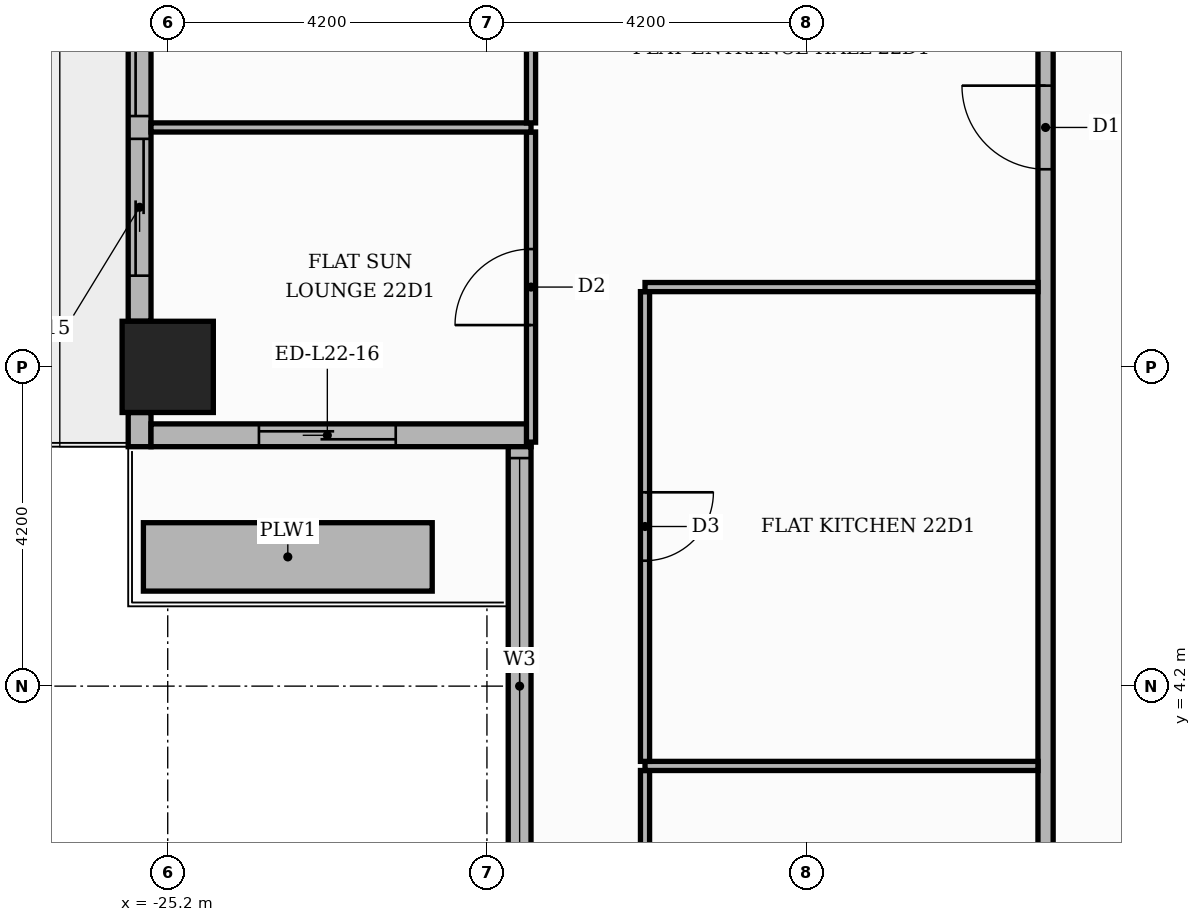
"""IFC4 building model, lengths in metres.
Left out: names, types, materials, properties, quantities, classifications, styles, units other than length and angle.
Written with IfcOpenShell. Run it as: python <this file> out.ifc"""

import sys

from ifc_helpers import new_model, si_unit, direction, frame, frame_2d, origin, origin_2d, place, context, subcontext, project, spatial, rectangle, extrude, element, fill, save


model = new_model("IFC4")
c1 = context("Model", 3, precision=1e-05, world=origin(), true_north=direction((0.0, 1.0)))
c2 = subcontext(c1, "Body", "Model", "MODEL_VIEW")
j1 = project(units=[si_unit("LENGTHUNIT", "METRE"), si_unit("PLANEANGLEUNIT", "RADIAN")], contexts=[c1])
p1 = place(None, origin())
s1 = spatial("IfcSite", under=j1, at=p1, CompositionType="ELEMENT")
p2 = place(p1, origin())
s2 = spatial("IfcBuilding", under=s1, at=p2, CompositionType="ELEMENT")
p3 = place(p2, frame((0.0, 0.0, 94.8)))
s3 = spatial("IfcBuildingStorey", under=s2, at=p3, CompositionType="ELEMENT", Elevation=94.8)
p4 = place(p3, frame((-25.2, 8.4, 0.0), z_axis=(0.0, 0.0, 1.0), x_axis=(1.0, 0.0, 0.0)))
e1 = element("IfcColumn", 1, at=p4, inside=s3, PredefinedType="COLUMN", context=c2, shape_type="SweptSolid", body=[
    extrude(rectangle(XDim=1.2, YDim=1.2, at=origin_2d()), origin(), (0.0, 0.0, 1.0), 3.9),
])
p5 = place(p3, frame((-25.57, 16.2, 0.0), z_axis=(0.0, 0.0, 1.0), x_axis=(0.0, -1.0, 0.0)))
e2 = element("IfcWall", 2, at=p5, inside=s3, PredefinedType="STANDARD", context=c2, shape_type="SweptSolid", body=[
    extrude(rectangle(XDim=7.2, YDim=0.3, at=frame_2d((3.6, 0.0))), origin(), (0.0, 0.0, 1.0), 3.48),
])
p6 = place(p5, frame((0.6, 0.0, 0.0)))
e3 = element("IfcOpeningElement", 3, at=p6, cuts=e2, PredefinedType="OPENING", context=c2, shape_type="SweptSolid", body=[
    extrude(rectangle(XDim=3.9, YDim=2.4, at=frame_2d((1.95, 1.2))), frame((0.0, 0.16, 0.0), z_axis=(0.0, -1.0, 0.0), x_axis=(1.0, 0.0, 0.0)), (0.0, 0.0, 1.0), 0.32),
])
p7 = place(p5, frame((4.8, 0.0, 0.0)))
e4 = element("IfcOpeningElement", 4, at=p7, cuts=e2, PredefinedType="OPENING", context=c2, shape_type="SweptSolid", body=[
    extrude(rectangle(XDim=1.8, YDim=2.4, at=frame_2d((0.9, 1.2))), frame((0.0, 0.16, 0.0), z_axis=(0.0, -1.0, 0.0), x_axis=(1.0, 0.0, 0.0)), (0.0, 0.0, 1.0), 0.32),
])
p8 = place(p3, frame((-25.57, 7.8, 0.0), z_axis=(0.0, 0.0, 1.0), x_axis=(0.0, -1.0, 0.0)))
e5 = element("IfcWall", 5, at=p8, inside=s3, PredefinedType="STANDARD", context=c2, shape_type="SweptSolid", body=[
    extrude(rectangle(XDim=0.45, YDim=0.3, at=frame_2d((0.225, 0.0))), origin(), (0.0, 0.0, 1.0), 3.48),
])
p9 = place(p3, frame((-25.42, 7.5, 0.0), z_axis=(0.0, 0.0, 1.0), x_axis=(1.0, 0.0, 0.0)))
e6 = element("IfcWall", 6, at=p9, inside=s3, PredefinedType="STANDARD", context=c2, shape_type="SweptSolid", body=[
    extrude(rectangle(XDim=5.0, YDim=0.3, at=frame_2d((2.5, 0.0))), origin(), (0.0, 0.0, 1.0), 3.48),
])
p10 = place(p9, frame((1.42, 0.0, 0.0)))
e7 = element("IfcOpeningElement", 7, at=p10, cuts=e6, PredefinedType="OPENING", context=c2, shape_type="SweptSolid", body=[
    extrude(rectangle(XDim=1.8, YDim=2.4, at=frame_2d((0.9, 1.2))), frame((0.0, 0.16, 0.0), z_axis=(0.0, -1.0, 0.0), x_axis=(1.0, 0.0, 0.0)), (0.0, 0.0, 1.0), 0.32),
])
p11 = place(p3, frame((-20.57, 7.35, 0.0), z_axis=(0.0, 0.0, 1.0), x_axis=(0.0, -1.0, 0.0)))
e8 = element("IfcWall", 8, at=p11, inside=s3, PredefinedType="STANDARD", context=c2, shape_type="SweptSolid", body=[
    extrude(rectangle(XDim=15.0, YDim=0.3, at=frame_2d((7.5, 0.0))), origin(), (0.0, 0.0, 1.0), 3.48),
])
p12 = place(p11, frame((0.15, 0.0, 0.9)))
e9 = element("IfcOpeningElement", 9, at=p12, cuts=e8, PredefinedType="OPENING", context=c2, shape_type="SweptSolid", body=[
    extrude(rectangle(XDim=6.0, YDim=2.1, at=frame_2d((3.0, 1.05))), frame((0.0, 0.16, 0.0), z_axis=(0.0, -1.0, 0.0), x_axis=(1.0, 0.0, 0.0)), (0.0, 0.0, 1.0), 0.32),
])
p13 = place(p11, frame((6.45, 0.0, 0.9)))
e10 = element("IfcOpeningElement", 10, at=p13, cuts=e8, PredefinedType="OPENING", context=c2, shape_type="SweptSolid", body=[
    extrude(rectangle(XDim=6.0, YDim=2.1, at=frame_2d((3.0, 1.05))), frame((0.0, 0.16, 0.0), z_axis=(0.0, -1.0, 0.0), x_axis=(1.0, 0.0, 0.0)), (0.0, 0.0, 1.0), 0.32),
])
p14 = place(p11, frame((12.75, 0.0, 0.9)))
e11 = element("IfcOpeningElement", 11, at=p14, cuts=e8, PredefinedType="OPENING", context=c2, shape_type="SweptSolid", body=[
    extrude(rectangle(XDim=1.8, YDim=2.1, at=frame_2d((0.9, 1.05))), frame((0.0, 0.16, 0.0), z_axis=(0.0, -1.0, 0.0), x_axis=(1.0, 0.0, 0.0)), (0.0, 0.0, 1.0), 0.32),
])
p15 = place(p3, frame((-25.52, 5.9, 0.0), z_axis=(0.0, 0.0, 1.0), x_axis=(1.0, 0.0, 0.0)))
e12 = element("IfcWall", 12, at=p15, inside=s3, PredefinedType="MOVABLE", context=c2, shape_type="SweptSolid", body=[
    extrude(rectangle(XDim=3.8, YDim=0.9, at=frame_2d((1.9, 0.0))), origin(), (0.0, 0.0, 1.0), 0.6),
])
p16 = place(p3, frame((-13.65, -13.55, 0.0), z_axis=(0.0, 0.0, 1.0), x_axis=(0.0, 1.0, 0.0)))
e13 = element("IfcWall", 13, at=p16, inside=s3, PredefinedType="PARTITIONING", context=c2, shape_type="SweptSolid", body=[
    extrude(rectangle(XDim=27.1, YDim=0.2, at=frame_2d((13.55, 0.0))), origin(), (0.0, 0.0, 1.0), 3.48),
])
p17 = place(p16, frame((24.55, 0.0, 0.0)))
e14 = element("IfcOpeningElement", 14, at=p17, cuts=e13, PredefinedType="OPENING", context=c2, shape_type="SweptSolid", body=[
    extrude(rectangle(XDim=1.1, YDim=2.4, at=frame_2d((0.55, 1.2))), frame((0.0, 0.11, 0.0), z_axis=(0.0, -1.0, 0.0), x_axis=(1.0, 0.0, 0.0)), (0.0, 0.0, 1.0), 0.22),
])
p18 = place(p3, frame((-18.92, -3.09, 0.0), z_axis=(0.0, 0.0, 1.0), x_axis=(0.0, 1.0, 0.0)))
e15 = element("IfcWall", 15, at=p18, inside=s3, PredefinedType="PARTITIONING", context=c2, shape_type="SweptSolid", body=[
    extrude(rectangle(XDim=6.18, YDim=0.12, at=frame_2d((3.09, 0.0))), origin(), (0.0, 0.0, 1.0), 3.48),
])
p19 = place(p18, frame((2.64, 0.0, 0.0)))
e16 = element("IfcOpeningElement", 16, at=p19, cuts=e15, PredefinedType="OPENING", context=c2, shape_type="SweptSolid", body=[
    extrude(rectangle(XDim=0.9, YDim=2.1, at=frame_2d((0.45, 1.05))), frame((0.0, 0.07, 0.0), z_axis=(0.0, -1.0, 0.0), x_axis=(1.0, 0.0, 0.0)), (0.0, 0.0, 1.0), 0.14),
])
p20 = place(p3, frame((-18.92, 3.15, 0.0), z_axis=(0.0, 0.0, 1.0), x_axis=(1.0, 0.0, 0.0)))
e17 = element("IfcWall", 17, at=p20, inside=s3, PredefinedType="PARTITIONING", context=c2, shape_type="SweptSolid", body=[
    extrude(rectangle(XDim=5.17, YDim=0.12, at=frame_2d((2.585, 0.0))), origin(), (0.0, 0.0, 1.0), 3.48),
])
p21 = place(p3, frame((-18.92, 3.21, 0.0), z_axis=(0.0, 0.0, 1.0), x_axis=(0.0, 1.0, 0.0)))
e18 = element("IfcWall", 18, at=p21, inside=s3, PredefinedType="PARTITIONING", context=c2, shape_type="SweptSolid", body=[
    extrude(rectangle(XDim=6.18, YDim=0.12, at=frame_2d((3.09, 0.0))), origin(), (0.0, 0.0, 1.0), 3.48),
])
p22 = place(p21, frame((2.64, 0.0, 0.0)))
e19 = element("IfcOpeningElement", 19, at=p22, cuts=e18, PredefinedType="OPENING", context=c2, shape_type="SweptSolid", body=[
    extrude(rectangle(XDim=0.9, YDim=2.1, at=frame_2d((0.45, 1.05))), frame((0.0, 0.07, 0.0), z_axis=(0.0, -1.0, 0.0), x_axis=(1.0, 0.0, 0.0)), (0.0, 0.0, 1.0), 0.14),
])
p23 = place(p3, frame((-20.42, 7.41, 0.0), z_axis=(0.0, 0.0, 1.0), x_axis=(0.0, 1.0, 0.0)))
e20 = element("IfcWall", 20, at=p23, inside=s3, PredefinedType="PARTITIONING", context=c2, shape_type="SweptSolid", body=[
    extrude(rectangle(XDim=4.08, YDim=0.12, at=frame_2d((2.04, 0.0))), origin(), (0.0, 0.0, 1.0), 3.48),
])
p24 = place(p23, frame((1.54, 0.0, 0.0)))
e21 = element("IfcOpeningElement", 21, at=p24, cuts=e20, PredefinedType="OPENING", context=c2, shape_type="SweptSolid", body=[
    extrude(rectangle(XDim=1.0, YDim=2.1, at=frame_2d((0.5, 1.05))), frame((0.0, 0.07, 0.0), z_axis=(0.0, -1.0, 0.0), x_axis=(1.0, 0.0, 0.0)), (0.0, 0.0, 1.0), 0.14),
])
p25 = place(p3, frame((-18.92, 9.45, 0.0), z_axis=(0.0, 0.0, 1.0), x_axis=(1.0, 0.0, 0.0)))
e22 = element("IfcWall", 22, at=p25, inside=s3, PredefinedType="PARTITIONING", context=c2, shape_type="SweptSolid", body=[
    extrude(rectangle(XDim=5.17, YDim=0.12, at=frame_2d((2.585, 0.0))), origin(), (0.0, 0.0, 1.0), 3.48),
])
p26 = place(p3, frame((-25.42, 11.55, 0.0), z_axis=(0.0, 0.0, 1.0), x_axis=(1.0, 0.0, 0.0)))
e23 = element("IfcWall", 23, at=p26, inside=s3, PredefinedType="PARTITIONING", context=c2, shape_type="SweptSolid", body=[
    extrude(rectangle(XDim=5.0, YDim=0.12, at=frame_2d((2.5, 0.0))), origin(), (0.0, 0.0, 1.0), 3.48),
])
p27 = place(p3, frame((-20.42, 11.61, 0.0), z_axis=(0.0, 0.0, 1.0), x_axis=(0.0, 1.0, 0.0)))
e24 = element("IfcWall", 24, at=p27, inside=s3, PredefinedType="PARTITIONING", context=c2, shape_type="SweptSolid", body=[
    extrude(rectangle(XDim=4.08, YDim=0.12, at=frame_2d((2.04, 0.0))), origin(), (0.0, 0.0, 1.0), 3.48),
])
p28 = place(p27, frame((1.54, 0.0, 0.0)))
e25 = element("IfcOpeningElement", 25, at=p28, cuts=e24, PredefinedType="OPENING", context=c2, shape_type="SweptSolid", body=[
    extrude(rectangle(XDim=1.0, YDim=2.1, at=frame_2d((0.5, 1.05))), frame((0.0, 0.07, 0.0), z_axis=(0.0, -1.0, 0.0), x_axis=(1.0, 0.0, 0.0)), (0.0, 0.0, 1.0), 0.14),
])
p29 = place(p6, origin())
e26 = element("IfcDoor", 26, at=p29, inside=s3, OperationType="SLIDING_TO_LEFT", PredefinedType="DOOR", context=c2, shape_type="SweptSolid", body=[
    extrude(rectangle(XDim=3.9, YDim=2.4, at=frame_2d((1.95, 1.2))), frame((0.0, 0.025, 0.0), z_axis=(0.0, -1.0, 0.0), x_axis=(1.0, 0.0, 0.0)), (0.0, 0.0, 1.0), 0.05),
])
fill(e3, e26)
p30 = place(p7, origin())
e27 = element("IfcDoor", 27, at=p30, inside=s3, OperationType="SLIDING_TO_RIGHT", PredefinedType="DOOR", context=c2, shape_type="SweptSolid", body=[
    extrude(rectangle(XDim=1.8, YDim=2.4, at=frame_2d((0.9, 1.2))), frame((0.0, 0.025, 0.0), z_axis=(0.0, -1.0, 0.0), x_axis=(1.0, 0.0, 0.0)), (0.0, 0.0, 1.0), 0.05),
])
fill(e4, e27)
p31 = place(p10, origin())
e28 = element("IfcDoor", 28, at=p31, inside=s3, OperationType="SLIDING_TO_LEFT", PredefinedType="DOOR", context=c2, shape_type="SweptSolid", body=[
    extrude(rectangle(XDim=1.8, YDim=2.4, at=frame_2d((0.9, 1.2))), frame((0.0, 0.025, 0.0), z_axis=(0.0, -1.0, 0.0), x_axis=(1.0, 0.0, 0.0)), (0.0, 0.0, 1.0), 0.05),
])
fill(e7, e28)
p32 = place(p12, origin())
e29 = element("IfcWindow", 29, at=p32, inside=s3, PartitioningType="SINGLE_PANEL", PredefinedType="WINDOW", context=c2, shape_type="SweptSolid", body=[
    extrude(rectangle(XDim=6.0, YDim=2.1, at=frame_2d((3.0, 1.05))), frame((0.0, 0.03, 0.0), z_axis=(0.0, -1.0, 0.0), x_axis=(1.0, 0.0, 0.0)), (0.0, 0.0, 1.0), 0.06),
])
fill(e9, e29)
p33 = place(p17, origin())
e30 = element("IfcDoor", 30, at=p33, inside=s3, OperationType="SINGLE_SWING_RIGHT", PredefinedType="DOOR", context=c2, shape_type="SweptSolid", body=[
    extrude(rectangle(XDim=1.1, YDim=2.4, at=frame_2d((0.55, 1.2))), frame((0.0, 0.025, 0.0), z_axis=(0.0, -1.0, 0.0), x_axis=(1.0, 0.0, 0.0)), (0.0, 0.0, 1.0), 0.05),
])
fill(e14, e30)
p34 = place(p22, frame((0.9, 0.0, 0.0), z_axis=(0.0, 0.0, 1.0), x_axis=(-1.0, 0.0, 0.0)))
e31 = element("IfcDoor", 31, at=p34, inside=s3, OperationType="SINGLE_SWING_RIGHT", PredefinedType="DOOR", context=c2, shape_type="SweptSolid", body=[
    extrude(rectangle(XDim=0.9, YDim=2.1, at=frame_2d((0.45, 1.05))), frame((0.0, 0.025, 0.0), z_axis=(0.0, -1.0, 0.0), x_axis=(1.0, 0.0, 0.0)), (0.0, 0.0, 1.0), 0.05),
])
fill(e19, e31)
p35 = place(p24, origin())
e32 = element("IfcDoor", 32, at=p35, inside=s3, OperationType="SINGLE_SWING_LEFT", PredefinedType="DOOR", context=c2, shape_type="SweptSolid", body=[
    extrude(rectangle(XDim=1.0, YDim=2.1, at=frame_2d((0.5, 1.05))), frame((0.0, 0.025, 0.0), z_axis=(0.0, -1.0, 0.0), x_axis=(1.0, 0.0, 0.0)), (0.0, 0.0, 1.0), 0.05),
])
fill(e21, e32)
save(model, sys.argv[1])
